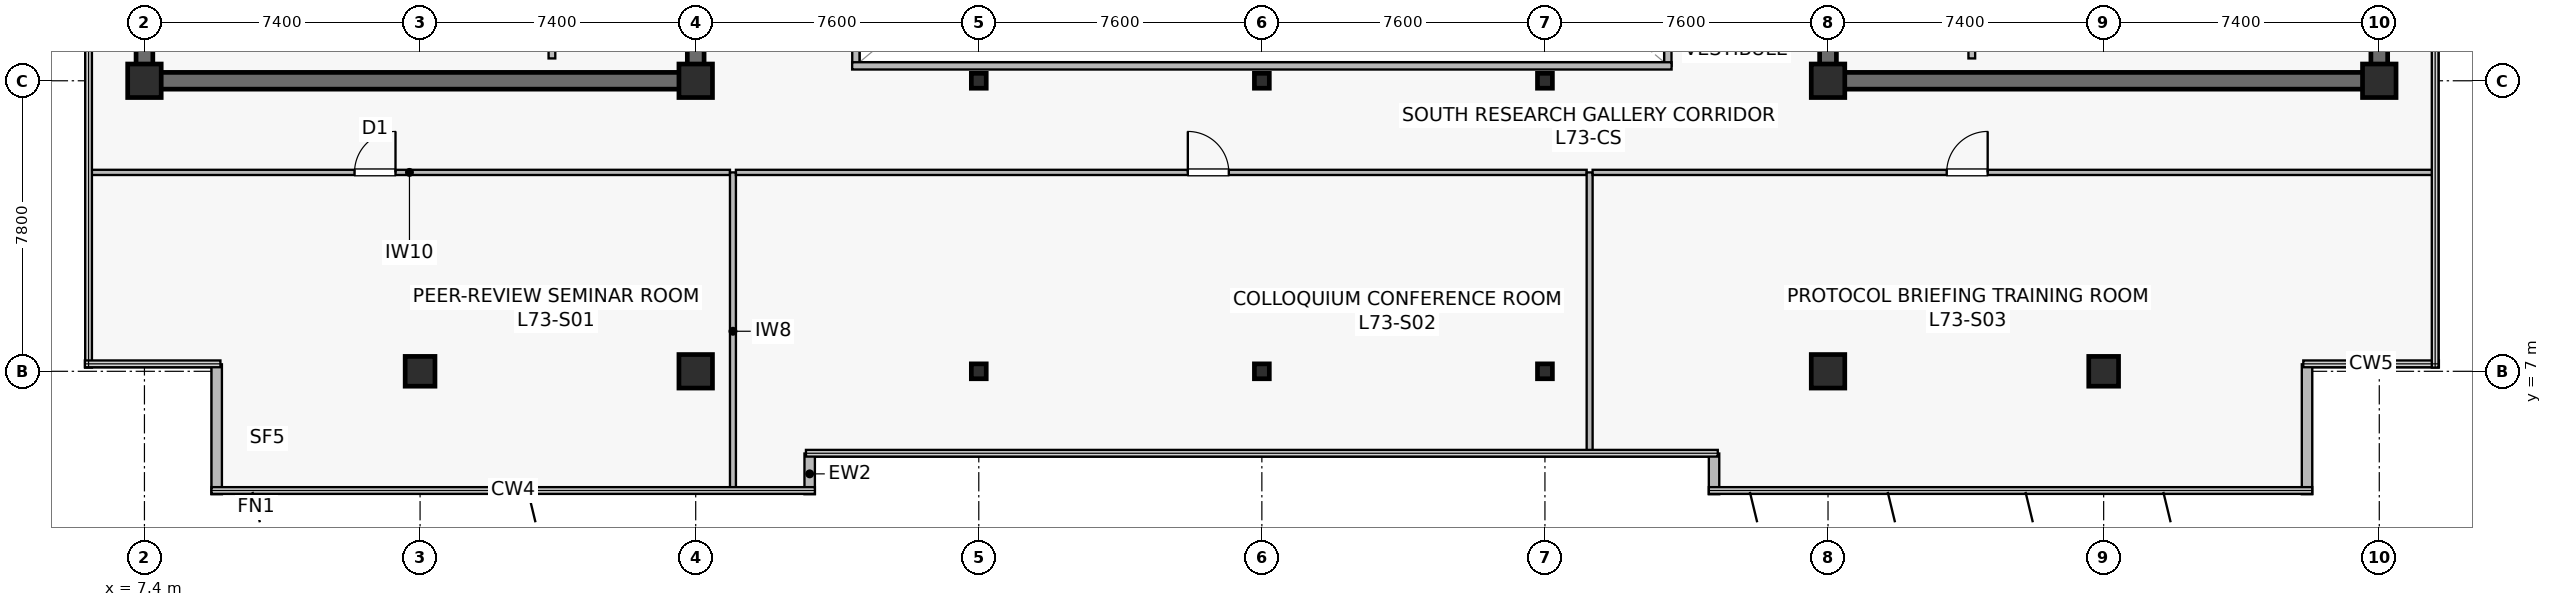
"""IFC4 building model, lengths in metres.
Left out: names, types, materials, properties, quantities, classifications, styles, units other than length and angle.
Written with IfcOpenShell. Run it as: python <this file> out.ifc"""

import sys

from ifc_helpers import new_model, si_unit, direction, frame, frame_2d, origin, origin_2d, place, context, subcontext, project, spatial, rectangle, i_section, extrude, source, transform, mapped, element, fill, save


model = new_model("IFC4")
c1 = context("Model", 3, precision=1e-05, world=origin(), true_north=direction((0.0, 1.0)))
c2 = subcontext(c1, "Body", "Model", "MODEL_VIEW")
j1 = project(units=[si_unit("LENGTHUNIT", "METRE"), si_unit("PLANEANGLEUNIT", "RADIAN")], contexts=[c1])
p1 = place(None, origin())
s1 = spatial("IfcSite", under=j1, at=p1, CompositionType="ELEMENT")
p2 = place(p1, origin())
s2 = spatial("IfcBuilding", under=s1, at=p2, CompositionType="ELEMENT")
p3 = place(p2, frame((0.0, 0.0, 306.0)))
s3 = spatial("IfcBuildingStorey", under=s2, at=p3, CompositionType="ELEMENT", Elevation=306.0)
p4 = place(p3, frame((7.175, 14.8, 0.0), z_axis=(0.0, 0.0, 1.0), x_axis=(1.0, 0.0, 0.0)))
e1 = element("IfcWall", 1, at=p4, inside=s3, PredefinedType="SHEAR", context=c2, shape_type="SweptSolid", body=[
    extrude(rectangle(XDim=15.25, YDim=0.45, at=frame_2d((7.625, 0.0))), origin(), (0.0, 0.0, 1.0), 3.9),
])
p5 = place(p3, frame((7.4, 15.025, 0.0), z_axis=(0.0, 0.0, 1.0), x_axis=(0.0, 1.0, 0.0)))
e2 = element("IfcWall", 2, at=p5, inside=s3, PredefinedType="SHEAR", context=c2, shape_type="SweptSolid", body=[
    extrude(rectangle(XDim=18.55, YDim=0.45, at=frame_2d((9.275, 0.0))), origin(), (0.0, 0.0, 1.0), 3.9),
])
p6 = place(p3, frame((22.2, 15.025, 0.0), z_axis=(0.0, 0.0, 1.0), x_axis=(0.0, 1.0, 0.0)))
e3 = element("IfcWall", 3, at=p6, inside=s3, PredefinedType="SHEAR", context=c2, shape_type="SweptSolid", body=[
    extrude(rectangle(XDim=18.55, YDim=0.45, at=frame_2d((9.275, 0.0))), origin(), (0.0, 0.0, 1.0), 3.9),
])
p7 = place(p6, frame((3.525, 0.0, 0.0)))
e4 = element("IfcOpeningElement", 4, at=p7, cuts=e3, PredefinedType="OPENING", context=c2, shape_type="SweptSolid", body=[
    extrude(rectangle(XDim=1.42, YDim=2.2, at=frame_2d((0.71, 1.1))), frame((0.0, 0.235, 0.0), z_axis=(0.0, -1.0, 0.0), x_axis=(1.0, 0.0, 0.0)), (0.0, 0.0, 1.0), 0.47),
])
p8 = place(p3, frame((52.375, 14.8, 0.0), z_axis=(0.0, 0.0, 1.0), x_axis=(1.0, 0.0, 0.0)))
e5 = element("IfcWall", 5, at=p8, inside=s3, PredefinedType="SHEAR", context=c2, shape_type="SweptSolid", body=[
    extrude(rectangle(XDim=15.25, YDim=0.45, at=frame_2d((7.625, 0.0))), origin(), (0.0, 0.0, 1.0), 3.9),
])
p9 = place(p3, frame((52.6, 15.025, 0.0), z_axis=(0.0, 0.0, 1.0), x_axis=(0.0, 1.0, 0.0)))
e6 = element("IfcWall", 6, at=p9, inside=s3, PredefinedType="SHEAR", context=c2, shape_type="SweptSolid", body=[
    extrude(rectangle(XDim=18.55, YDim=0.45, at=frame_2d((9.275, 0.0))), origin(), (0.0, 0.0, 1.0), 3.9),
])
p10 = place(p9, frame((3.525, 0.0, 0.0)))
e7 = element("IfcOpeningElement", 7, at=p10, cuts=e6, PredefinedType="OPENING", context=c2, shape_type="SweptSolid", body=[
    extrude(rectangle(XDim=1.42, YDim=2.2, at=frame_2d((0.71, 1.1))), frame((0.0, 0.235, 0.0), z_axis=(0.0, -1.0, 0.0), x_axis=(1.0, 0.0, 0.0)), (0.0, 0.0, 1.0), 0.47),
])
p11 = place(p3, frame((67.4, 15.025, 0.0), z_axis=(0.0, 0.0, 1.0), x_axis=(0.0, 1.0, 0.0)))
e8 = element("IfcWall", 8, at=p11, inside=s3, PredefinedType="SHEAR", context=c2, shape_type="SweptSolid", body=[
    extrude(rectangle(XDim=18.55, YDim=0.45, at=frame_2d((9.275, 0.0))), origin(), (0.0, 0.0, 1.0), 3.9),
])
m1 = source(origin(), c2, "Body", "SweptSolid", [
    extrude(rectangle(XDim=0.8, YDim=0.8, at=origin_2d()), origin(), (0.0, 0.0, 1.0), 4.2),
])
p12 = place(p3, frame((14.8, 7.0, 0.0), z_axis=(0.0, 0.0, 1.0), x_axis=(1.0, 0.0, 0.0)))
e9 = element("IfcColumn", 9, at=p12, inside=s3, PredefinedType="COLUMN", context=c2, shape_type="MappedRepresentation", body=[
    mapped(m1, transform((0.0, 0.0, 0.0), scale=1.0)),
])
m2 = source(origin(), c2, "Body", "SweptSolid", [
    extrude(rectangle(XDim=0.9, YDim=0.9, at=origin_2d()), origin(), (0.0, 0.0, 1.0), 4.2),
])
for number, where, z_axis, x_axis in (
    (10, (22.2, 7.0, 0.0), (0.0, 0.0, 1.0), (1.0, 0.0, 0.0)),
    (11, (7.4, 14.8, 0.0), (0.0, 0.0, 1.0), (1.0, 0.0, 0.0)),
    (12, (22.2, 14.8, 0.0), (0.0, 0.0, 1.0), (1.0, 0.0, 0.0)),
    (13, (52.6, 7.0, 0.0), (0.0, 0.0, 1.0), (1.0, 0.0, 0.0)),
):
    element("IfcColumn", number, at=place(p3, frame(where, z_axis=z_axis, x_axis=x_axis)), inside=s3, PredefinedType="COLUMN", context=c2, shape_type="MappedRepresentation", body=[
        mapped(m2, transform((0.0, 0.0, 0.0), scale=1.0)),
    ])
p13 = place(p3, frame((60.0, 7.0, 0.0), z_axis=(0.0, 0.0, 1.0), x_axis=(1.0, 0.0, 0.0)))
e14 = element("IfcColumn", 14, at=p13, inside=s3, PredefinedType="COLUMN", context=c2, shape_type="MappedRepresentation", body=[
    mapped(m1, transform((0.0, 0.0, 0.0), scale=1.0)),
])
for number, where, z_axis, x_axis in (
    (15, (52.6, 14.8, 0.0), (0.0, 0.0, 1.0), (1.0, 0.0, 0.0)),
    (16, (67.4, 14.8, 0.0), (0.0, 0.0, 1.0), (1.0, 0.0, 0.0)),
):
    element("IfcColumn", number, at=place(p3, frame(where, z_axis=z_axis, x_axis=x_axis)), inside=s3, PredefinedType="COLUMN", context=c2, shape_type="MappedRepresentation", body=[
        mapped(m2, transform((0.0, 0.0, 0.0), scale=1.0)),
    ])
m3 = source(origin(), c2, "Body", "SweptSolid", [
    extrude(i_section(OverallWidth=0.4, OverallDepth=0.4, WebThickness=0.021, FlangeThickness=0.021, at=origin_2d()), origin(), (0.0, 0.0, 1.0), 4.2),
])
for number, where, z_axis, x_axis in (
    (17, (29.8, 7.0, 0.0), (0.0, 0.0, 1.0), (1.0, 0.0, 0.0)),
    (18, (29.8, 14.8, 0.0), (0.0, 0.0, 1.0), (1.0, 0.0, 0.0)),
    (19, (37.4, 7.0, 0.0), (0.0, 0.0, 1.0), (1.0, 0.0, 0.0)),
    (20, (37.4, 14.8, 0.0), (0.0, 0.0, 1.0), (1.0, 0.0, 0.0)),
    (21, (45.0, 7.0, 0.0), (0.0, 0.0, 1.0), (1.0, 0.0, 0.0)),
    (22, (45.0, 14.8, 0.0), (0.0, 0.0, 1.0), (1.0, 0.0, 0.0)),
):
    element("IfcColumn", number, at=place(p3, frame(where, z_axis=z_axis, x_axis=x_axis)), inside=s3, PredefinedType="COLUMN", context=c2, shape_type="MappedRepresentation", body=[
        mapped(m3, transform((0.0, 0.0, 0.0), scale=1.0)),
    ])
for number, where, z_axis, x_axis in (
    (23, (25.26, 3.7, 0.0), (0.0, 0.0, 1.0), (0.0, 1.0, 0.0)),
    (24, (49.54, 4.793, 0.0), (0.0, 0.0, 1.0), (0.0, -1.0, 0.0)),
):
    element("IfcWall", number, at=place(p3, frame(where, z_axis=z_axis, x_axis=x_axis)), inside=s3, PredefinedType="STANDARD", context=c2, shape_type="SweptSolid", body=[
        extrude(rectangle(XDim=1.093, YDim=0.28, at=frame_2d((0.546, 0.0))), origin(), (0.0, 0.0, 1.0), 3.9),
    ])
for number, where, z_axis, x_axis in (
    (25, (65.46, 3.7, 0.0), (0.0, 0.0, 1.0), (0.0, 1.0, 0.0)),
    (26, (9.34, 7.188, 0.0), (0.0, 0.0, 1.0), (0.0, -1.0, 0.0)),
):
    element("IfcWall", number, at=place(p3, frame(where, z_axis=z_axis, x_axis=x_axis)), inside=s3, PredefinedType="STANDARD", context=c2, shape_type="SweptSolid", body=[
        extrude(rectangle(XDim=3.488, YDim=0.28, at=frame_2d((1.744, 0.0))), origin(), (0.0, 0.0, 1.0), 3.9),
    ])
for number, where, z_axis, x_axis in (
    (27, (18.34, 15.4, 0.0), (0.0, 0.0, 1.0), (0.0, 1.0, 0.0)),
    (28, (56.46, 15.4, 0.0), (0.0, 0.0, 1.0), (0.0, 1.0, 0.0)),
):
    element("IfcWall", number, at=place(p3, frame(where, z_axis=z_axis, x_axis=x_axis)), inside=s3, PredefinedType="SOLIDWALL", context=c2, shape_type="SweptSolid", body=[
        extrude(rectangle(XDim=2.4, YDim=0.18, at=frame_2d((1.2, 0.0))), origin(), (0.0, 0.0, 1.0), 3.9),
    ])
p14 = place(p3, frame((26.5, 15.2, 0.0), z_axis=(0.0, 0.0, 1.0), x_axis=(0.0, 1.0, 0.0)))
e29 = element("IfcWall", 29, at=p14, inside=s3, PredefinedType="SOLIDWALL", context=c2, shape_type="SweptSolid", body=[
    extrude(rectangle(XDim=18.2, YDim=0.195, at=frame_2d((9.1, 0.0))), origin(), (0.0, 0.0, 1.0), 3.9),
])
p15 = place(p14, frame((1.8, 0.0, 0.9)))
e30 = element("IfcOpeningElement", 30, at=p15, cuts=e29, PredefinedType="OPENING", context=c2, shape_type="SweptSolid", body=[
    extrude(rectangle(XDim=1.2, YDim=1.35, at=frame_2d((0.6, 0.675))), frame((0.0, 0.107, 0.0), z_axis=(0.0, -1.0, 0.0), x_axis=(1.0, 0.0, 0.0)), (0.0, 0.0, 1.0), 0.215),
])
p16 = place(p14, frame((13.2, 0.0, 0.9)))
e31 = element("IfcOpeningElement", 31, at=p16, cuts=e29, PredefinedType="OPENING", context=c2, shape_type="SweptSolid", body=[
    extrude(rectangle(XDim=1.2, YDim=1.35, at=frame_2d((0.6, 0.675))), frame((0.0, 0.107, 0.0), z_axis=(0.0, -1.0, 0.0), x_axis=(1.0, 0.0, 0.0)), (0.0, 0.0, 1.0), 0.215),
])
p17 = place(p3, frame((48.3, 15.2, 0.0), z_axis=(0.0, 0.0, 1.0), x_axis=(0.0, 1.0, 0.0)))
e32 = element("IfcWall", 32, at=p17, inside=s3, PredefinedType="SOLIDWALL", context=c2, shape_type="SweptSolid", body=[
    extrude(rectangle(XDim=18.2, YDim=0.195, at=frame_2d((9.1, 0.0))), origin(), (0.0, 0.0, 1.0), 3.9),
])
p18 = place(p17, frame((1.8, 0.0, 0.9)))
e33 = element("IfcOpeningElement", 33, at=p18, cuts=e32, PredefinedType="OPENING", context=c2, shape_type="SweptSolid", body=[
    extrude(rectangle(XDim=1.2, YDim=1.35, at=frame_2d((0.6, 0.675))), frame((0.0, 0.107, 0.0), z_axis=(0.0, -1.0, 0.0), x_axis=(1.0, 0.0, 0.0)), (0.0, 0.0, 1.0), 0.215),
])
p19 = place(p17, frame((13.2, 0.0, 0.9)))
e34 = element("IfcOpeningElement", 34, at=p19, cuts=e32, PredefinedType="OPENING", context=c2, shape_type="SweptSolid", body=[
    extrude(rectangle(XDim=1.2, YDim=1.35, at=frame_2d((0.6, 0.675))), frame((0.0, 0.107, 0.0), z_axis=(0.0, -1.0, 0.0), x_axis=(1.0, 0.0, 0.0)), (0.0, 0.0, 1.0), 0.215),
])
p20 = place(p3, frame((26.4, 15.2, 0.0), z_axis=(0.0, 0.0, 1.0), x_axis=(1.0, 0.0, 0.0)))
e35 = element("IfcWall", 35, at=p20, inside=s3, PredefinedType="SOLIDWALL", context=c2, shape_type="SweptSolid", body=[
    extrude(rectangle(XDim=22.0, YDim=0.195, at=frame_2d((11.0, 0.0))), origin(), (0.0, 0.0, 1.0), 3.9),
])
p21 = place(p3, frame((5.91, 12.34, 0.0), z_axis=(0.0, 0.0, 1.0), x_axis=(1.0, 0.0, 0.0)))
e36 = element("IfcWall", 36, at=p21, inside=s3, PredefinedType="PARTITIONING", context=c2, shape_type="SweptSolid", body=[
    extrude(rectangle(XDim=17.21, YDim=0.14, at=frame_2d((8.605, 0.0))), origin(), (0.0, 0.0, 1.0), 3.297),
])
p22 = place(p21, frame((7.13, 0.0, 0.0)))
e37 = element("IfcOpeningElement", 37, at=p22, cuts=e36, PredefinedType="OPENING", context=c2, shape_type="SweptSolid", body=[
    extrude(rectangle(XDim=1.1, YDim=2.18, at=frame_2d((0.55, 1.09))), frame((0.0, 0.08, 0.0), z_axis=(0.0, -1.0, 0.0), x_axis=(1.0, 0.0, 0.0)), (0.0, 0.0, 1.0), 0.16),
])
p23 = place(p3, frame((23.2, 3.81, 0.0), z_axis=(0.0, 0.0, 1.0), x_axis=(0.0, 1.0, 0.0)))
e38 = element("IfcWall", 38, at=p23, inside=s3, PredefinedType="PARTITIONING", context=c2, shape_type="SweptSolid", body=[
    extrude(rectangle(XDim=8.53, YDim=0.16, at=frame_2d((4.265, 0.0))), origin(), (0.0, 0.0, 1.0), 2.985),
])
p24 = place(p3, frame((23.28, 12.34, 0.0), z_axis=(0.0, 0.0, 1.0), x_axis=(1.0, 0.0, 0.0)))
e39 = element("IfcWall", 39, at=p24, inside=s3, PredefinedType="PARTITIONING", context=c2, shape_type="SweptSolid", body=[
    extrude(rectangle(XDim=22.84, YDim=0.14, at=frame_2d((11.42, 0.0))), origin(), (0.0, 0.0, 1.0), 3.297),
])
p25 = place(p24, frame((12.132, 0.0, 0.0)))
e40 = element("IfcOpeningElement", 40, at=p25, cuts=e39, PredefinedType="OPENING", context=c2, shape_type="SweptSolid", body=[
    extrude(rectangle(XDim=1.1, YDim=2.18, at=frame_2d((0.55, 1.09))), frame((0.0, 0.08, 0.0), z_axis=(0.0, -1.0, 0.0), x_axis=(1.0, 0.0, 0.0)), (0.0, 0.0, 1.0), 0.16),
])
p26 = place(p3, frame((46.2, 4.81, 0.0), z_axis=(0.0, 0.0, 1.0), x_axis=(0.0, 1.0, 0.0)))
e41 = element("IfcWall", 41, at=p26, inside=s3, PredefinedType="PARTITIONING", context=c2, shape_type="SweptSolid", body=[
    extrude(rectangle(XDim=7.53, YDim=0.16, at=frame_2d((3.765, 0.0))), origin(), (0.0, 0.0, 1.0), 2.985),
])
p27 = place(p3, frame((46.28, 12.34, 0.0), z_axis=(0.0, 0.0, 1.0), x_axis=(1.0, 0.0, 0.0)))
e42 = element("IfcWall", 42, at=p27, inside=s3, PredefinedType="PARTITIONING", context=c2, shape_type="SweptSolid", body=[
    extrude(rectangle(XDim=22.61, YDim=0.14, at=frame_2d((11.305, 0.0))), origin(), (0.0, 0.0, 1.0), 3.297),
])
p28 = place(p27, frame((9.506, 0.0, 0.0)))
e43 = element("IfcOpeningElement", 43, at=p28, cuts=e42, PredefinedType="OPENING", context=c2, shape_type="SweptSolid", body=[
    extrude(rectangle(XDim=1.1, YDim=2.18, at=frame_2d((0.55, 1.09))), frame((0.0, 0.08, 0.0), z_axis=(0.0, -1.0, 0.0), x_axis=(1.0, 0.0, 0.0)), (0.0, 0.0, 1.0), 0.16),
])
m4 = source(origin(), c2, "Body", "SweptSolid", [
    extrude(rectangle(XDim=1.1, YDim=2.18, at=frame_2d((0.55, 1.09))), frame((0.0, 0.025, 0.0), z_axis=(0.0, -1.0, 0.0), x_axis=(1.0, 0.0, 0.0)), (0.0, 0.0, 1.0), 0.05),
])
p29 = place(p22, origin())
e44 = element("IfcDoor", 44, at=p29, inside=s3, OperationType="SINGLE_SWING_RIGHT", PredefinedType="DOOR", context=c2, shape_type="MappedRepresentation", body=[
    mapped(m4, transform((0.0, 0.0, 0.0), scale=1.0)),
])
fill(e37, e44)
p30 = place(p25, origin())
e45 = element("IfcDoor", 45, at=p30, inside=s3, OperationType="SINGLE_SWING_LEFT", PredefinedType="DOOR", context=c2, shape_type="MappedRepresentation", body=[
    mapped(m4, transform((0.0, 0.0, 0.0), scale=1.0)),
])
fill(e40, e45)
p31 = place(p28, origin())
e46 = element("IfcDoor", 46, at=p31, inside=s3, OperationType="SINGLE_SWING_RIGHT", PredefinedType="DOOR", context=c2, shape_type="MappedRepresentation", body=[
    mapped(m4, transform((0.0, 0.0, 0.0), scale=1.0)),
])
fill(e43, e46)
save(model, sys.argv[1])
